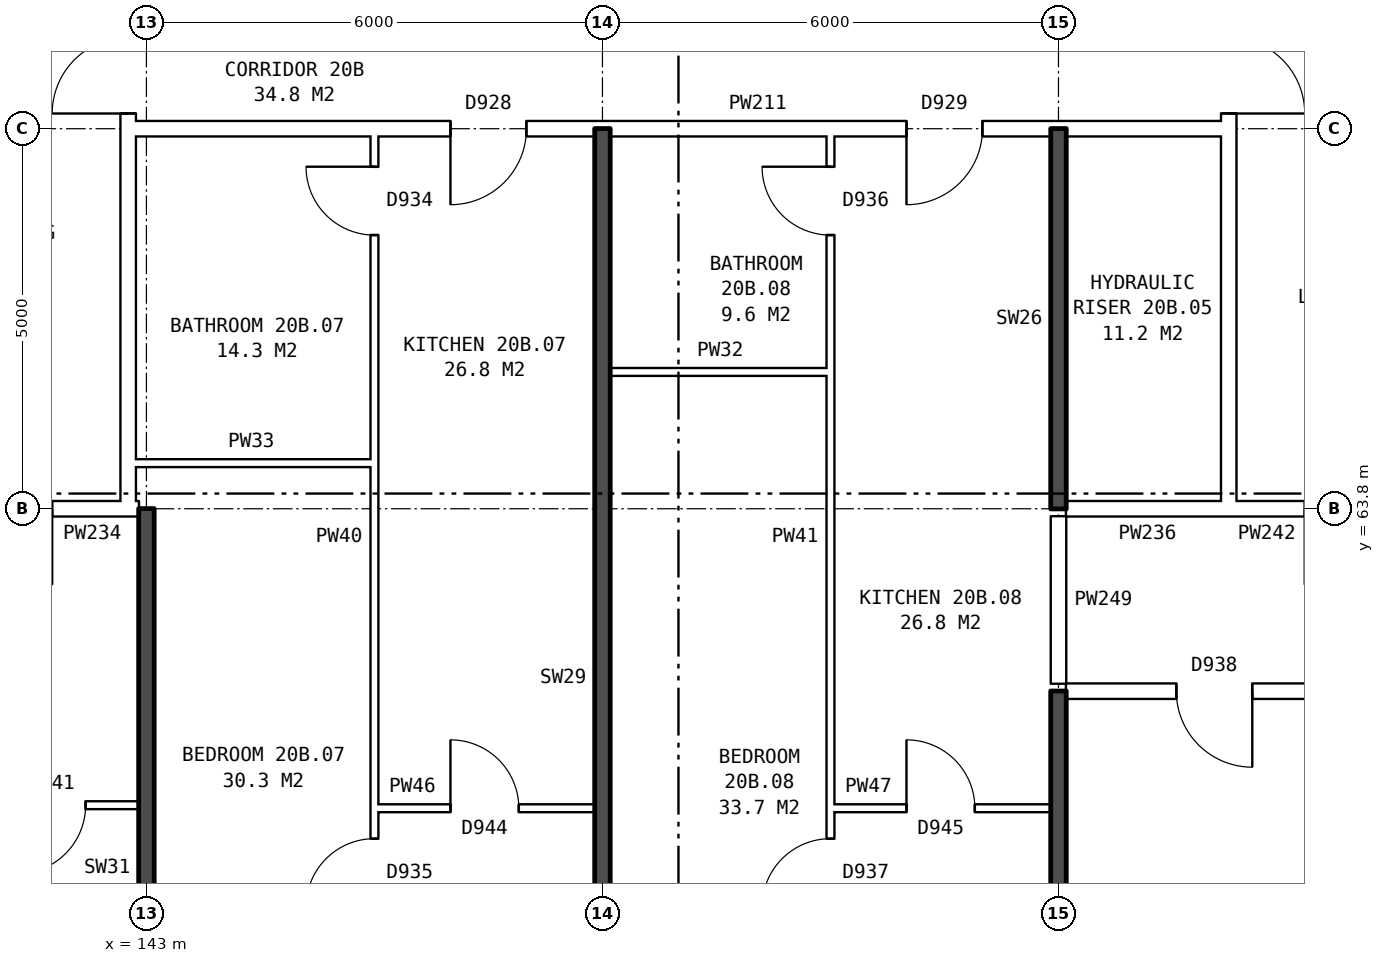
"""IFC4 building model, lengths in metres.
Left out: names, types, materials, properties, quantities, classifications, styles, units other than length and angle.
Written with IfcOpenShell. Run it as: python <this file> out.ifc"""

import sys

from ifc_helpers import new_model, si_unit, direction, frame, frame_2d, origin, place, context, subcontext, project, spatial, rectangle, extrude, element, fill, save


model = new_model("IFC4")
c1 = context("Model", 3, precision=1e-05, world=origin(), true_north=direction((0.0, 1.0)))
c2 = subcontext(c1, "Body", "Model", "MODEL_VIEW")
j1 = project(units=[si_unit("LENGTHUNIT", "METRE"), si_unit("PLANEANGLEUNIT", "RADIAN")], contexts=[c1])
p1 = place(None, origin())
s1 = spatial("IfcSite", under=j1, at=p1, CompositionType="ELEMENT")
p2 = place(p1, origin())
s2 = spatial("IfcBuilding", under=s1, at=p2, CompositionType="ELEMENT")
p3 = place(p2, frame((0.0, 0.0, 74.7)))
s3 = spatial("IfcBuildingStorey", under=s2, at=p3, CompositionType="ELEMENT", Elevation=74.7)
p4 = place(p3, frame((142.76, 63.9, 0.0), z_axis=(0.0, 0.0, 1.0), x_axis=(0.0, 1.0, 0.0)))
e1 = element("IfcWall", 1, at=p4, inside=s3, PredefinedType="PARTITIONING", context=c2, shape_type="SweptSolid", body=[
    extrude(rectangle(XDim=12.2, YDim=0.2, at=frame_2d((6.1, 0.0))), origin(), (0.0, 0.0, 1.0), 2.85),
])
p5 = place(p4, frame((5.1, 0.0, 0.0)))
e2 = element("IfcOpeningElement", 2, at=p5, cuts=e1, PredefinedType="OPENING", context=c2, shape_type="SweptSolid", body=[
    extrude(rectangle(XDim=2.0, YDim=2.1, at=frame_2d((1.0, 1.05))), frame((0.0, 0.11, 0.0), z_axis=(0.0, -1.0, 0.0), x_axis=(1.0, 0.0, 0.0)), (0.0, 0.0, 1.0), 0.22),
])
p6 = place(p3, frame((157.24, 63.9, 0.0), z_axis=(0.0, 0.0, 1.0), x_axis=(0.0, 1.0, 0.0)))
e3 = element("IfcWall", 3, at=p6, inside=s3, PredefinedType="PARTITIONING", context=c2, shape_type="SweptSolid", body=[
    extrude(rectangle(XDim=12.2, YDim=0.2, at=frame_2d((6.1, 0.0))), origin(), (0.0, 0.0, 1.0), 2.85),
])
p7 = place(p6, frame((5.1, 0.0, 0.0)))
e4 = element("IfcOpeningElement", 4, at=p7, cuts=e3, PredefinedType="OPENING", context=c2, shape_type="SweptSolid", body=[
    extrude(rectangle(XDim=2.0, YDim=2.1, at=frame_2d((1.0, 1.05))), frame((0.0, 0.11, 0.0), z_axis=(0.0, -1.0, 0.0), x_axis=(1.0, 0.0, 0.0)), (0.0, 0.0, 1.0), 0.22),
])
p8 = place(p3, frame((146.0, 59.86, 0.0), z_axis=(0.0, 0.0, 1.0), x_axis=(1.0, 0.0, 0.0)))
e5 = element("IfcWall", 5, at=p8, inside=s3, PredefinedType="PARTITIONING", context=c2, shape_type="SweptSolid", body=[
    extrude(rectangle(XDim=2.9, YDim=0.1, at=frame_2d((1.45, 0.0))), origin(), (0.0, 0.0, 1.0), 2.85),
])
p9 = place(p8, frame((1.0, 0.0, 0.0)))
e6 = element("IfcOpeningElement", 6, at=p9, cuts=e5, PredefinedType="OPENING", context=c2, shape_type="SweptSolid", body=[
    extrude(rectangle(XDim=0.9, YDim=2.1, at=frame_2d((0.45, 1.05))), frame((0.0, 0.06, 0.0), z_axis=(0.0, -1.0, 0.0), x_axis=(1.0, 0.0, 0.0)), (0.0, 0.0, 1.0), 0.12),
])
p10 = place(p3, frame((152.0, 59.86, 0.0), z_axis=(0.0, 0.0, 1.0), x_axis=(1.0, 0.0, 0.0)))
e7 = element("IfcWall", 7, at=p10, inside=s3, PredefinedType="PARTITIONING", context=c2, shape_type="SweptSolid", body=[
    extrude(rectangle(XDim=2.9, YDim=0.1, at=frame_2d((1.45, 0.0))), origin(), (0.0, 0.0, 1.0), 2.85),
])
p11 = place(p10, frame((1.0, 0.0, 0.0)))
e8 = element("IfcOpeningElement", 8, at=p11, cuts=e7, PredefinedType="OPENING", context=c2, shape_type="SweptSolid", body=[
    extrude(rectangle(XDim=0.9, YDim=2.1, at=frame_2d((0.45, 1.05))), frame((0.0, 0.06, 0.0), z_axis=(0.0, -1.0, 0.0), x_axis=(1.0, 0.0, 0.0)), (0.0, 0.0, 1.0), 0.12),
])
p12 = place(p3, frame((137.1, 59.9, 0.0), z_axis=(0.0, 0.0, 1.0), x_axis=(1.0, 0.0, 0.0)))
e9 = element("IfcWall", 9, at=p12, inside=s3, PredefinedType="PARTITIONING", context=c2, shape_type="SweptSolid", body=[
    extrude(rectangle(XDim=5.8, YDim=0.1, at=frame_2d((2.9, 0.0))), origin(), (0.0, 0.0, 1.0), 2.85),
])
p13 = place(p12, frame((1.3, 0.0, 0.0)))
e10 = element("IfcOpeningElement", 10, at=p13, cuts=e9, PredefinedType="OPENING", context=c2, shape_type="SweptSolid", body=[
    extrude(rectangle(XDim=0.9, YDim=2.1, at=frame_2d((0.45, 1.05))), frame((0.0, 0.06, 0.0), z_axis=(0.0, -1.0, 0.0), x_axis=(1.0, 0.0, 0.0)), (0.0, 0.0, 1.0), 0.12),
])
p14 = place(p12, frame((4.2, 0.0, 0.0)))
e11 = element("IfcOpeningElement", 11, at=p14, cuts=e9, PredefinedType="OPENING", context=c2, shape_type="SweptSolid", body=[
    extrude(rectangle(XDim=0.9, YDim=2.1, at=frame_2d((0.45, 1.05))), frame((0.0, 0.06, 0.0), z_axis=(0.0, -1.0, 0.0), x_axis=(1.0, 0.0, 0.0)), (0.0, 0.0, 1.0), 0.12),
])
p15 = place(p3, frame((155.1, 61.4, 0.0), z_axis=(0.0, 0.0, 1.0), x_axis=(1.0, 0.0, 0.0)))
e12 = element("IfcWall", 12, at=p15, inside=s3, PredefinedType="PARTITIONING", context=c2, shape_type="SweptSolid", body=[
    extrude(rectangle(XDim=19.79, YDim=0.2, at=frame_2d((9.895, 0.0))), origin(), (0.0, 0.0, 1.0), 2.85),
])
p16 = place(p15, frame((1.45, 0.0, 0.0)))
e13 = element("IfcOpeningElement", 13, at=p16, cuts=e12, PredefinedType="OPENING", context=c2, shape_type="SweptSolid", body=[
    extrude(rectangle(XDim=1.0, YDim=2.1, at=frame_2d((0.5, 1.05))), frame((0.0, 0.11, 0.0), z_axis=(0.0, -1.0, 0.0), x_axis=(1.0, 0.0, 0.0)), (0.0, 0.0, 1.0), 0.22),
])
p17 = place(p15, frame((7.4, 0.0, 0.0)))
e14 = element("IfcOpeningElement", 14, at=p17, cuts=e12, PredefinedType="OPENING", context=c2, shape_type="SweptSolid", body=[
    extrude(rectangle(XDim=1.0, YDim=2.1, at=frame_2d((0.5, 1.05))), frame((0.0, 0.11, 0.0), z_axis=(0.0, -1.0, 0.0), x_axis=(1.0, 0.0, 0.0)), (0.0, 0.0, 1.0), 0.22),
])
p18 = place(p15, frame((13.2, 0.0, 0.0)))
e15 = element("IfcOpeningElement", 15, at=p18, cuts=e12, PredefinedType="OPENING", context=c2, shape_type="SweptSolid", body=[
    extrude(rectangle(XDim=1.0, YDim=2.1, at=frame_2d((0.5, 1.05))), frame((0.0, 0.11, 0.0), z_axis=(0.0, -1.0, 0.0), x_axis=(1.0, 0.0, 0.0)), (0.0, 0.0, 1.0), 0.22),
])
p19 = place(p3, frame((139.76, 63.8, 0.0), z_axis=(0.0, 0.0, 1.0), x_axis=(1.0, 0.0, 0.0)))
e16 = element("IfcWall", 16, at=p19, inside=s3, PredefinedType="PARTITIONING", context=c2, shape_type="SweptSolid", body=[
    extrude(rectangle(XDim=3.0, YDim=0.2, at=frame_2d((1.5, 0.0))), origin(), (0.0, 0.0, 1.0), 2.85),
])
p20 = place(p19, frame((1.0, 0.0, 0.0)))
e17 = element("IfcOpeningElement", 17, at=p20, cuts=e16, PredefinedType="OPENING", context=c2, shape_type="SweptSolid", body=[
    extrude(rectangle(XDim=1.0, YDim=2.1, at=frame_2d((0.5, 1.05))), frame((0.0, 0.11, 0.0), z_axis=(0.0, -1.0, 0.0), x_axis=(1.0, 0.0, 0.0)), (0.0, 0.0, 1.0), 0.22),
])
p21 = place(p3, frame((142.76, 63.8, 0.0), z_axis=(0.0, 0.0, 1.0), x_axis=(1.0, 0.0, 0.0)))
e18 = element("IfcWall", 18, at=p21, inside=s3, PredefinedType="PARTITIONING", context=c2, shape_type="SweptSolid", body=[
    extrude(rectangle(XDim=0.14, YDim=0.2, at=frame_2d((0.07, 0.0))), origin(), (0.0, 0.0, 1.0), 2.85),
])
p22 = place(p3, frame((155.1, 63.8, 0.0), z_axis=(0.0, 0.0, 1.0), x_axis=(1.0, 0.0, 0.0)))
e19 = element("IfcWall", 19, at=p22, inside=s3, PredefinedType="PARTITIONING", context=c2, shape_type="SweptSolid", body=[
    extrude(rectangle(XDim=2.14, YDim=0.2, at=frame_2d((1.07, 0.0))), origin(), (0.0, 0.0, 1.0), 2.85),
])
p23 = place(p3, frame((157.24, 63.8, 0.0), z_axis=(0.0, 0.0, 1.0), x_axis=(1.0, 0.0, 0.0)))
e20 = element("IfcWall", 20, at=p23, inside=s3, PredefinedType="PARTITIONING", context=c2, shape_type="SweptSolid", body=[
    extrude(rectangle(XDim=3.0, YDim=0.2, at=frame_2d((1.5, 0.0))), origin(), (0.0, 0.0, 1.0), 2.85),
])
p24 = place(p23, frame((1.0, 0.0, 0.0)))
e21 = element("IfcOpeningElement", 21, at=p24, cuts=e20, PredefinedType="OPENING", context=c2, shape_type="SweptSolid", body=[
    extrude(rectangle(XDim=1.0, YDim=2.1, at=frame_2d((0.5, 1.05))), frame((0.0, 0.11, 0.0), z_axis=(0.0, -1.0, 0.0), x_axis=(1.0, 0.0, 0.0)), (0.0, 0.0, 1.0), 0.22),
])
p25 = place(p3, frame((142.76, 64.4, 0.0), z_axis=(0.0, 0.0, 1.0), x_axis=(1.0, 0.0, 0.0)))
e22 = element("IfcWall", 22, at=p25, inside=s3, PredefinedType="PARTITIONING", context=c2, shape_type="SweptSolid", body=[
    extrude(rectangle(XDim=3.24, YDim=0.1, at=frame_2d((1.62, 0.0))), origin(), (0.0, 0.0, 1.0), 2.85),
])
p26 = place(p3, frame((149.1, 65.6, 0.0), z_axis=(0.0, 0.0, 1.0), x_axis=(1.0, 0.0, 0.0)))
e23 = element("IfcWall", 23, at=p26, inside=s3, PredefinedType="PARTITIONING", context=c2, shape_type="SweptSolid", body=[
    extrude(rectangle(XDim=2.9, YDim=0.1, at=frame_2d((1.45, 0.0))), origin(), (0.0, 0.0, 1.0), 2.85),
])
p27 = place(p3, frame((142.76, 68.8, 0.0), z_axis=(0.0, 0.0, 1.0), x_axis=(1.0, 0.0, 0.0)))
e24 = element("IfcWall", 24, at=p27, inside=s3, PredefinedType="PARTITIONING", context=c2, shape_type="SweptSolid", body=[
    extrude(rectangle(XDim=14.48, YDim=0.2, at=frame_2d((7.24, 0.0))), origin(), (0.0, 0.0, 1.0), 2.85),
])
p28 = place(p27, frame((4.24, 0.0, 0.0)))
e25 = element("IfcOpeningElement", 25, at=p28, cuts=e24, PredefinedType="OPENING", context=c2, shape_type="SweptSolid", body=[
    extrude(rectangle(XDim=1.0, YDim=2.1, at=frame_2d((0.5, 1.05))), frame((0.0, 0.11, 0.0), z_axis=(0.0, -1.0, 0.0), x_axis=(1.0, 0.0, 0.0)), (0.0, 0.0, 1.0), 0.22),
])
p29 = place(p27, frame((10.24, 0.0, 0.0)))
e26 = element("IfcOpeningElement", 26, at=p29, cuts=e24, PredefinedType="OPENING", context=c2, shape_type="SweptSolid", body=[
    extrude(rectangle(XDim=1.0, YDim=2.1, at=frame_2d((0.5, 1.05))), frame((0.0, 0.11, 0.0), z_axis=(0.0, -1.0, 0.0), x_axis=(1.0, 0.0, 0.0)), (0.0, 0.0, 1.0), 0.22),
])
p30 = place(p3, frame((143.0, 54.36, 0.0), z_axis=(0.0, 0.0, 1.0), x_axis=(0.0, 1.0, 0.0)))
e27 = element("IfcWall", 27, at=p30, inside=s3, PredefinedType="SOLIDWALL", context=c2, shape_type="SweptSolid", body=[
    extrude(rectangle(XDim=9.44, YDim=0.2, at=frame_2d((4.72, 0.0))), origin(), (0.0, 0.0, 1.0), 2.85),
])
p31 = place(p3, frame((146.0, 54.36, 0.0), z_axis=(0.0, 0.0, 1.0), x_axis=(0.0, 1.0, 0.0)))
e28 = element("IfcWall", 28, at=p31, inside=s3, PredefinedType="PARTITIONING", context=c2, shape_type="SweptSolid", body=[
    extrude(rectangle(XDim=14.34, YDim=0.1, at=frame_2d((7.17, 0.0))), origin(), (0.0, 0.0, 1.0), 2.85),
])
p32 = place(p31, frame((4.2, 0.0, 0.0)))
e29 = element("IfcOpeningElement", 29, at=p32, cuts=e28, PredefinedType="OPENING", context=c2, shape_type="SweptSolid", body=[
    extrude(rectangle(XDim=0.9, YDim=2.1, at=frame_2d((0.45, 1.05))), frame((0.0, 0.06, 0.0), z_axis=(0.0, -1.0, 0.0), x_axis=(1.0, 0.0, 0.0)), (0.0, 0.0, 1.0), 0.12),
])
p33 = place(p31, frame((13.04, 0.0, 0.0)))
e30 = element("IfcOpeningElement", 30, at=p33, cuts=e28, PredefinedType="OPENING", context=c2, shape_type="SweptSolid", body=[
    extrude(rectangle(XDim=0.9, YDim=2.1, at=frame_2d((0.45, 1.05))), frame((0.0, 0.06, 0.0), z_axis=(0.0, -1.0, 0.0), x_axis=(1.0, 0.0, 0.0)), (0.0, 0.0, 1.0), 0.12),
])
p34 = place(p3, frame((149.0, 54.36, 0.0), z_axis=(0.0, 0.0, 1.0), x_axis=(0.0, 1.0, 0.0)))
e31 = element("IfcWall", 31, at=p34, inside=s3, PredefinedType="SOLIDWALL", context=c2, shape_type="SweptSolid", body=[
    extrude(rectangle(XDim=14.44, YDim=0.2, at=frame_2d((7.22, 0.0))), origin(), (0.0, 0.0, 1.0), 2.85),
])
p35 = place(p3, frame((152.0, 54.36, 0.0), z_axis=(0.0, 0.0, 1.0), x_axis=(0.0, 1.0, 0.0)))
e32 = element("IfcWall", 32, at=p35, inside=s3, PredefinedType="PARTITIONING", context=c2, shape_type="SweptSolid", body=[
    extrude(rectangle(XDim=14.34, YDim=0.1, at=frame_2d((7.17, 0.0))), origin(), (0.0, 0.0, 1.0), 2.85),
])
p36 = place(p35, frame((4.2, 0.0, 0.0)))
e33 = element("IfcOpeningElement", 33, at=p36, cuts=e32, PredefinedType="OPENING", context=c2, shape_type="SweptSolid", body=[
    extrude(rectangle(XDim=0.9, YDim=2.1, at=frame_2d((0.45, 1.05))), frame((0.0, 0.06, 0.0), z_axis=(0.0, -1.0, 0.0), x_axis=(1.0, 0.0, 0.0)), (0.0, 0.0, 1.0), 0.12),
])
p37 = place(p35, frame((13.04, 0.0, 0.0)))
e34 = element("IfcOpeningElement", 34, at=p37, cuts=e32, PredefinedType="OPENING", context=c2, shape_type="SweptSolid", body=[
    extrude(rectangle(XDim=0.9, YDim=2.1, at=frame_2d((0.45, 1.05))), frame((0.0, 0.06, 0.0), z_axis=(0.0, -1.0, 0.0), x_axis=(1.0, 0.0, 0.0)), (0.0, 0.0, 1.0), 0.12),
])
p38 = place(p3, frame((155.0, 54.36, 0.0), z_axis=(0.0, 0.0, 1.0), x_axis=(0.0, 1.0, 0.0)))
e35 = element("IfcWall", 35, at=p38, inside=s3, PredefinedType="SOLIDWALL", context=c2, shape_type="SweptSolid", body=[
    extrude(rectangle(XDim=7.04, YDim=0.2, at=frame_2d((3.52, 0.0))), origin(), (0.0, 0.0, 1.0), 2.85),
])
p39 = place(p3, frame((155.0, 61.5, 0.0), z_axis=(0.0, 0.0, 1.0), x_axis=(0.0, 1.0, 0.0)))
e36 = element("IfcWall", 36, at=p39, inside=s3, PredefinedType="PARTITIONING", context=c2, shape_type="SweptSolid", body=[
    extrude(rectangle(XDim=2.2, YDim=0.2, at=frame_2d((1.1, 0.0))), origin(), (0.0, 0.0, 1.0), 2.85),
])
p40 = place(p3, frame((155.0, 63.8, 0.0), z_axis=(0.0, 0.0, 1.0), x_axis=(0.0, 1.0, 0.0)))
e37 = element("IfcWall", 37, at=p40, inside=s3, PredefinedType="SOLIDWALL", context=c2, shape_type="SweptSolid", body=[
    extrude(rectangle(XDim=5.0, YDim=0.2, at=frame_2d((2.5, 0.0))), origin(), (0.0, 0.0, 1.0), 2.85),
])
p41 = place(p5, origin())
e38 = element("IfcDoor", 38, at=p41, inside=s3, OperationType="DOUBLE_DOOR_SINGLE_SWING", PredefinedType="DOOR", context=c2, shape_type="SweptSolid", body=[
    extrude(rectangle(XDim=2.0, YDim=2.1, at=frame_2d((1.0, 1.05))), frame((0.0, 0.025, 0.0), z_axis=(0.0, -1.0, 0.0), x_axis=(1.0, 0.0, 0.0)), (0.0, 0.0, 1.0), 0.05),
])
fill(e2, e38)
p42 = place(p7, frame((2.0, 0.0, 0.0), z_axis=(0.0, 0.0, 1.0), x_axis=(-1.0, 0.0, 0.0)))
e39 = element("IfcDoor", 39, at=p42, inside=s3, OperationType="DOUBLE_DOOR_SINGLE_SWING", PredefinedType="DOOR", context=c2, shape_type="SweptSolid", body=[
    extrude(rectangle(XDim=2.0, YDim=2.1, at=frame_2d((1.0, 1.05))), frame((0.0, 0.025, 0.0), z_axis=(0.0, -1.0, 0.0), x_axis=(1.0, 0.0, 0.0)), (0.0, 0.0, 1.0), 0.05),
])
fill(e4, e39)
p43 = place(p14, frame((0.9, 0.0, 0.0), z_axis=(0.0, 0.0, 1.0), x_axis=(-1.0, 0.0, 0.0)))
e40 = element("IfcDoor", 40, at=p43, inside=s3, OperationType="SINGLE_SWING_RIGHT", PredefinedType="DOOR", context=c2, shape_type="SweptSolid", body=[
    extrude(rectangle(XDim=0.9, YDim=2.1, at=frame_2d((0.45, 1.05))), frame((0.0, 0.025, 0.0), z_axis=(0.0, -1.0, 0.0), x_axis=(1.0, 0.0, 0.0)), (0.0, 0.0, 1.0), 0.05),
])
fill(e11, e40)
p44 = place(p32, origin())
e41 = element("IfcDoor", 41, at=p44, inside=s3, OperationType="SINGLE_SWING_LEFT", PredefinedType="DOOR", context=c2, shape_type="SweptSolid", body=[
    extrude(rectangle(XDim=0.9, YDim=2.1, at=frame_2d((0.45, 1.05))), frame((0.0, 0.025, 0.0), z_axis=(0.0, -1.0, 0.0), x_axis=(1.0, 0.0, 0.0)), (0.0, 0.0, 1.0), 0.05),
])
fill(e29, e41)
p45 = place(p28, frame((1.0, 0.0, 0.0), z_axis=(0.0, 0.0, 1.0), x_axis=(-1.0, 0.0, 0.0)))
e42 = element("IfcDoor", 42, at=p45, inside=s3, OperationType="SINGLE_SWING_RIGHT", PredefinedType="DOOR", context=c2, shape_type="SweptSolid", body=[
    extrude(rectangle(XDim=1.0, YDim=2.1, at=frame_2d((0.5, 1.05))), frame((0.0, 0.025, 0.0), z_axis=(0.0, -1.0, 0.0), x_axis=(1.0, 0.0, 0.0)), (0.0, 0.0, 1.0), 0.05),
])
fill(e25, e42)
p46 = place(p9, origin())
e43 = element("IfcDoor", 43, at=p46, inside=s3, OperationType="SINGLE_SWING_LEFT", PredefinedType="DOOR", context=c2, shape_type="SweptSolid", body=[
    extrude(rectangle(XDim=0.9, YDim=2.1, at=frame_2d((0.45, 1.05))), frame((0.0, 0.025, 0.0), z_axis=(0.0, -1.0, 0.0), x_axis=(1.0, 0.0, 0.0)), (0.0, 0.0, 1.0), 0.05),
])
fill(e6, e43)
p47 = place(p33, origin())
e44 = element("IfcDoor", 44, at=p47, inside=s3, OperationType="SINGLE_SWING_RIGHT", PredefinedType="DOOR", context=c2, shape_type="SweptSolid", body=[
    extrude(rectangle(XDim=0.9, YDim=2.1, at=frame_2d((0.45, 1.05))), frame((0.0, 0.025, 0.0), z_axis=(0.0, -1.0, 0.0), x_axis=(1.0, 0.0, 0.0)), (0.0, 0.0, 1.0), 0.05),
])
fill(e30, e44)
p48 = place(p36, origin())
e45 = element("IfcDoor", 45, at=p48, inside=s3, OperationType="SINGLE_SWING_LEFT", PredefinedType="DOOR", context=c2, shape_type="SweptSolid", body=[
    extrude(rectangle(XDim=0.9, YDim=2.1, at=frame_2d((0.45, 1.05))), frame((0.0, 0.025, 0.0), z_axis=(0.0, -1.0, 0.0), x_axis=(1.0, 0.0, 0.0)), (0.0, 0.0, 1.0), 0.05),
])
fill(e33, e45)
p49 = place(p29, frame((1.0, 0.0, 0.0), z_axis=(0.0, 0.0, 1.0), x_axis=(-1.0, 0.0, 0.0)))
e46 = element("IfcDoor", 46, at=p49, inside=s3, OperationType="SINGLE_SWING_RIGHT", PredefinedType="DOOR", context=c2, shape_type="SweptSolid", body=[
    extrude(rectangle(XDim=1.0, YDim=2.1, at=frame_2d((0.5, 1.05))), frame((0.0, 0.025, 0.0), z_axis=(0.0, -1.0, 0.0), x_axis=(1.0, 0.0, 0.0)), (0.0, 0.0, 1.0), 0.05),
])
fill(e26, e46)
p50 = place(p11, origin())
e47 = element("IfcDoor", 47, at=p50, inside=s3, OperationType="SINGLE_SWING_LEFT", PredefinedType="DOOR", context=c2, shape_type="SweptSolid", body=[
    extrude(rectangle(XDim=0.9, YDim=2.1, at=frame_2d((0.45, 1.05))), frame((0.0, 0.025, 0.0), z_axis=(0.0, -1.0, 0.0), x_axis=(1.0, 0.0, 0.0)), (0.0, 0.0, 1.0), 0.05),
])
fill(e8, e47)
p51 = place(p37, origin())
e48 = element("IfcDoor", 48, at=p51, inside=s3, OperationType="SINGLE_SWING_RIGHT", PredefinedType="DOOR", context=c2, shape_type="SweptSolid", body=[
    extrude(rectangle(XDim=0.9, YDim=2.1, at=frame_2d((0.45, 1.05))), frame((0.0, 0.025, 0.0), z_axis=(0.0, -1.0, 0.0), x_axis=(1.0, 0.0, 0.0)), (0.0, 0.0, 1.0), 0.05),
])
fill(e34, e48)
p52 = place(p16, frame((1.0, 0.0, 0.0), z_axis=(0.0, 0.0, 1.0), x_axis=(-1.0, 0.0, 0.0)))
e49 = element("IfcDoor", 49, at=p52, inside=s3, OperationType="SINGLE_SWING_LEFT", PredefinedType="DOOR", context=c2, shape_type="SweptSolid", body=[
    extrude(rectangle(XDim=1.0, YDim=2.1, at=frame_2d((0.5, 1.05))), frame((0.0, 0.025, 0.0), z_axis=(0.0, -1.0, 0.0), x_axis=(1.0, 0.0, 0.0)), (0.0, 0.0, 1.0), 0.05),
])
fill(e13, e49)
save(model, sys.argv[1])
